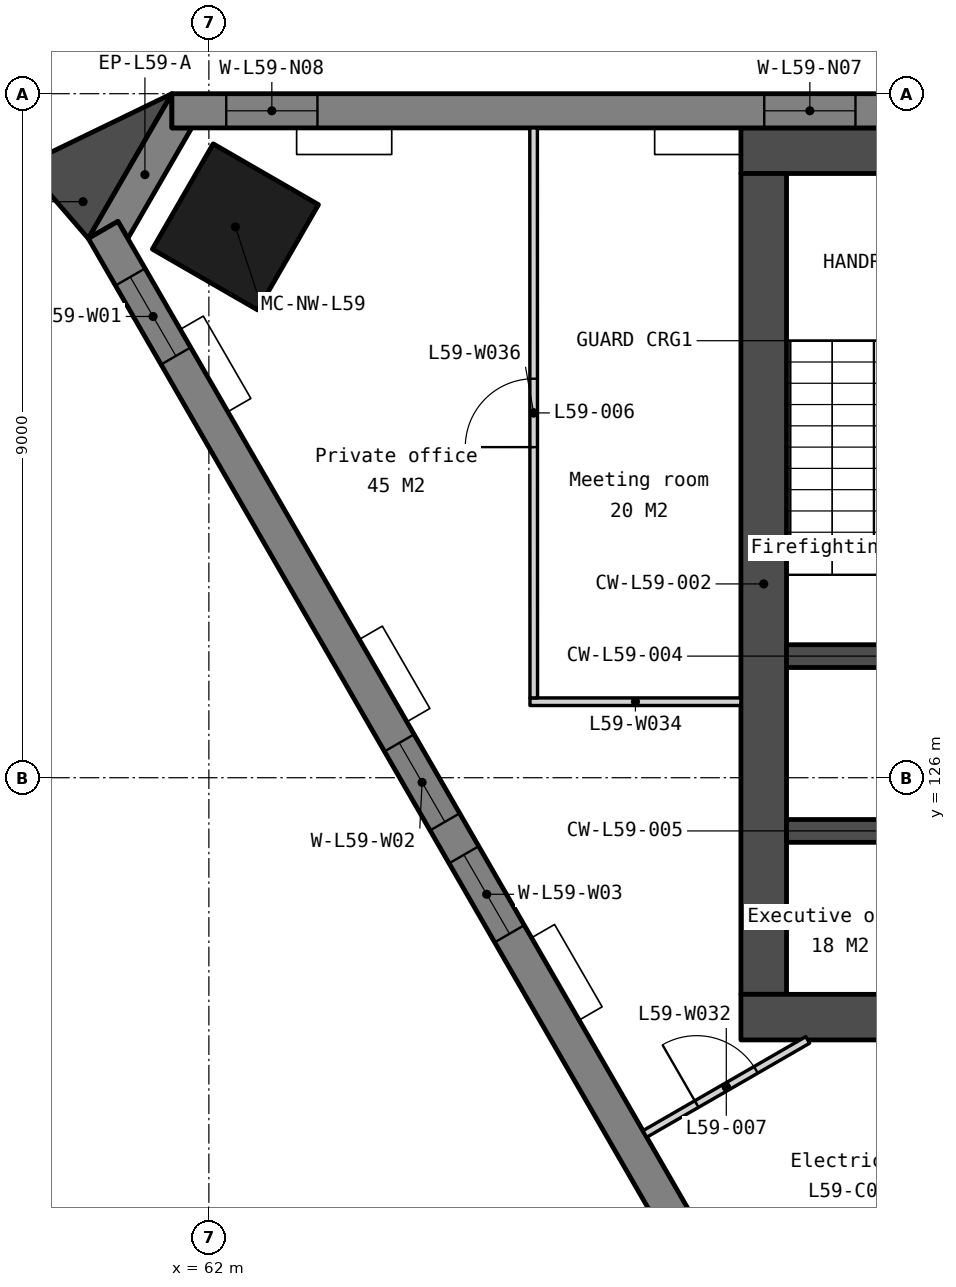
"""IFC4 building model, lengths in metres.
Left out: names, types, materials, properties, quantities, classifications, styles, units other than length and angle.
Written with IfcOpenShell. Run it as: python <this file> out.ifc"""

import sys

from ifc_helpers import new_model, si_unit, direction, frame, frame_2d, origin, origin_2d, place, context, subcontext, project, spatial, polyline, rectangle, outline, extrude, element, fill, save


model = new_model("IFC4")
c1 = context("Model", 3, precision=1e-05, world=origin(), true_north=direction((0.0, 1.0)))
c2 = subcontext(c1, "Body", "Model", "MODEL_VIEW")
j1 = project(units=[si_unit("LENGTHUNIT", "METRE"), si_unit("PLANEANGLEUNIT", "RADIAN")], contexts=[c1])
p1 = place(None, origin())
s1 = spatial("IfcSite", under=j1, at=p1, CompositionType="ELEMENT")
p2 = place(p1, origin())
s2 = spatial("IfcBuilding", under=s1, at=p2, CompositionType="ELEMENT")
p3 = place(p2, frame((0.0, 0.0, 242.6)))
s3 = spatial("IfcBuildingStorey", under=s2, at=p3, CompositionType="ELEMENT", Elevation=242.6)
p4 = place(p3, frame((62.349, 133.247, 0.0), z_axis=(0.0, 0.0, 1.0), x_axis=(-0.5, -0.866025403784, 0.0)))
e1 = element("IfcColumn", 1, at=p4, inside=s3, PredefinedType="COLUMN", context=c2, shape_type="SweptSolid", body=[
    extrude(rectangle(XDim=1.6, YDim=1.6, at=origin_2d()), origin(), (0.0, 0.0, 1.0), 3.9),
])
p5 = place(p3, frame((69.0, 134.25, 0.0), z_axis=(0.0, 0.0, 1.0), x_axis=(1.0, 0.0, 0.0)))
e2 = element("IfcWall", 2, at=p5, inside=s3, PredefinedType="SOLIDWALL", context=c2, shape_type="SweptSolid", body=[
    extrude(rectangle(XDim=22.0, YDim=0.6, at=frame_2d((11.0, 0.0))), origin(), (0.0, 0.0, 1.0), 3.75),
])
p6 = place(p3, frame((69.3, 133.95, 0.0), z_axis=(0.0, 0.0, 1.0), x_axis=(0.0, -1.0, 0.0)))
e3 = element("IfcWall", 3, at=p6, inside=s3, PredefinedType="SOLIDWALL", context=c2, shape_type="SweptSolid", body=[
    extrude(rectangle(XDim=10.8, YDim=0.6, at=frame_2d((5.4, 0.0))), origin(), (0.0, 0.0, 1.0), 3.75),
])
p7 = place(p3, frame((69.0, 122.85, 0.0), z_axis=(0.0, 0.0, 1.0), x_axis=(1.0, 0.0, 0.0)))
e4 = element("IfcWall", 4, at=p7, inside=s3, PredefinedType="SOLIDWALL", context=c2, shape_type="SweptSolid", body=[
    extrude(rectangle(XDim=22.0, YDim=0.6, at=frame_2d((11.0, 0.0))), origin(), (0.0, 0.0, 1.0), 3.75),
])
p8 = place(p7, frame((16.375, 0.0, 0.0)))
e5 = element("IfcOpeningElement", 5, at=p8, cuts=e4, PredefinedType="OPENING", context=c2, shape_type="SweptSolid", body=[
    extrude(rectangle(XDim=1.8, YDim=2.1, at=frame_2d((0.9, 1.05))), frame((0.0, 0.31, 0.0), z_axis=(0.0, -1.0, 0.0), x_axis=(1.0, 0.0, 0.0)), (0.0, 0.0, 1.0), 0.62),
])
p9 = place(p7, frame((3.825, 0.0, 0.0)))
e6 = element("IfcOpeningElement", 6, at=p9, cuts=e4, PredefinedType="OPENING", context=c2, shape_type="SweptSolid", body=[
    extrude(rectangle(XDim=1.8, YDim=2.1, at=frame_2d((0.9, 1.05))), frame((0.0, 0.31, 0.0), z_axis=(0.0, -1.0, 0.0), x_axis=(1.0, 0.0, 0.0)), (0.0, 0.0, 1.0), 0.62),
])
p10 = place(p7, frame((12.85, 0.0, 0.0)))
e7 = element("IfcOpeningElement", 7, at=p10, cuts=e4, PredefinedType="OPENING", context=c2, shape_type="SweptSolid", body=[
    extrude(rectangle(XDim=1.5, YDim=2.1, at=frame_2d((0.75, 1.05))), frame((0.0, 0.31, 0.0), z_axis=(0.0, -1.0, 0.0), x_axis=(1.0, 0.0, 0.0)), (0.0, 0.0, 1.0), 0.62),
])
for number, where, z_axis, x_axis in (
    (8, (69.6, 127.6, 0.0), (0.0, 0.0, 1.0), (1.0, 0.0, 0.0)),
    (9, (69.6, 125.3, 0.0), (0.0, 0.0, 1.0), (1.0, 0.0, 0.0)),
):
    element("IfcWall", number, at=place(p3, frame(where, z_axis=z_axis, x_axis=x_axis)), inside=s3, PredefinedType="SOLIDWALL", context=c2, shape_type="SweptSolid", body=[
        extrude(rectangle(XDim=2.55, YDim=0.3, at=frame_2d((1.275, 0.0))), origin(), (0.0, 0.0, 1.0), 3.75),
    ])
p11 = place(p3, frame((0.0, 0.0, -0.15)))
e10 = element("IfcWall", 10, at=p11, inside=s3, PredefinedType="SOLIDWALL", context=c2, shape_type="SweptSolid", body=[
    extrude(outline(polyline([(61.514, 135.0), (61.514, 134.55), (61.774, 134.55), (60.933, 133.095), (60.803, 133.32), (60.414, 133.095), (61.514, 135.0)])), origin(), (0.0, 0.0, 1.0), 3.9),
])
p12 = place(p3, frame((98.486, 134.775, -0.15), z_axis=(0.0, 0.0, 1.0), x_axis=(-1.0, 0.0, 0.0)))
e11 = element("IfcWall", 11, at=p12, inside=s3, PredefinedType="SOLIDWALL", context=c2, shape_type="SweptSolid", body=[
    extrude(outline(polyline([(36.972, 0.0), (36.972, 3.9), (0.0, 3.9), (0.0, 0.0), (36.972, 0.0)])), frame((0.0, 0.225, 0.0), z_axis=(0.0, -1.0, 0.0), x_axis=(1.0, 0.0, 0.0)), (0.0, 0.0, 1.0), 0.45),
])
p13 = place(p12, frame((0.715, 0.0, 0.95)))
e12 = element("IfcOpeningElement", 12, at=p13, cuts=e11, PredefinedType="OPENING", context=c2, shape_type="SweptSolid", body=[
    extrude(rectangle(XDim=1.2, YDim=2.2, at=frame_2d((0.6, 1.1))), frame((0.0, 0.235, 0.0), z_axis=(0.0, -1.0, 0.0), x_axis=(1.0, 0.0, 0.0)), (0.0, 0.0, 1.0), 0.47),
])
p14 = place(p12, frame((7.793, 0.0, 0.95)))
e13 = element("IfcOpeningElement", 13, at=p14, cuts=e11, PredefinedType="OPENING", context=c2, shape_type="SweptSolid", body=[
    extrude(rectangle(XDim=1.2, YDim=2.2, at=frame_2d((0.6, 1.1))), frame((0.0, 0.235, 0.0), z_axis=(0.0, -1.0, 0.0), x_axis=(1.0, 0.0, 0.0)), (0.0, 0.0, 1.0), 0.47),
])
p15 = place(p12, frame((9.493, 0.0, 0.95)))
e14 = element("IfcOpeningElement", 14, at=p15, cuts=e11, PredefinedType="OPENING", context=c2, shape_type="SweptSolid", body=[
    extrude(rectangle(XDim=1.2, YDim=2.2, at=frame_2d((0.6, 1.1))), frame((0.0, 0.235, 0.0), z_axis=(0.0, -1.0, 0.0), x_axis=(1.0, 0.0, 0.0)), (0.0, 0.0, 1.0), 0.47),
])
p16 = place(p12, frame((17.036, 0.0, 0.95)))
e15 = element("IfcOpeningElement", 15, at=p16, cuts=e11, PredefinedType="OPENING", context=c2, shape_type="SweptSolid", body=[
    extrude(rectangle(XDim=1.2, YDim=2.2, at=frame_2d((0.6, 1.1))), frame((0.0, 0.235, 0.0), z_axis=(0.0, -1.0, 0.0), x_axis=(1.0, 0.0, 0.0)), (0.0, 0.0, 1.0), 0.47),
])
p17 = place(p12, frame((18.736, 0.0, 0.95)))
e16 = element("IfcOpeningElement", 16, at=p17, cuts=e11, PredefinedType="OPENING", context=c2, shape_type="SweptSolid", body=[
    extrude(rectangle(XDim=1.2, YDim=2.2, at=frame_2d((0.6, 1.1))), frame((0.0, 0.235, 0.0), z_axis=(0.0, -1.0, 0.0), x_axis=(1.0, 0.0, 0.0)), (0.0, 0.0, 1.0), 0.47),
])
p18 = place(p12, frame((26.279, 0.0, 0.95)))
e17 = element("IfcOpeningElement", 17, at=p18, cuts=e11, PredefinedType="OPENING", context=c2, shape_type="SweptSolid", body=[
    extrude(rectangle(XDim=1.2, YDim=2.2, at=frame_2d((0.6, 1.1))), frame((0.0, 0.235, 0.0), z_axis=(0.0, -1.0, 0.0), x_axis=(1.0, 0.0, 0.0)), (0.0, 0.0, 1.0), 0.47),
])
p19 = place(p12, frame((27.979, 0.0, 0.95)))
e18 = element("IfcOpeningElement", 18, at=p19, cuts=e11, PredefinedType="OPENING", context=c2, shape_type="SweptSolid", body=[
    extrude(rectangle(XDim=1.2, YDim=2.2, at=frame_2d((0.6, 1.1))), frame((0.0, 0.235, 0.0), z_axis=(0.0, -1.0, 0.0), x_axis=(1.0, 0.0, 0.0)), (0.0, 0.0, 1.0), 0.47),
])
p20 = place(p12, frame((35.058, 0.0, 0.95)))
e19 = element("IfcOpeningElement", 19, at=p20, cuts=e11, PredefinedType="OPENING", context=c2, shape_type="SweptSolid", body=[
    extrude(rectangle(XDim=1.2, YDim=2.2, at=frame_2d((0.6, 1.1))), frame((0.0, 0.235, 0.0), z_axis=(0.0, -1.0, 0.0), x_axis=(1.0, 0.0, 0.0)), (0.0, 0.0, 1.0), 0.47),
])
p21 = place(p3, frame((60.609, 133.207, -0.15), z_axis=(0.0, 0.0, 1.0), x_axis=(0.500002536638, -0.866023939251, 0.0)))
e20 = element("IfcWall", 20, at=p21, inside=s3, PredefinedType="SOLIDWALL", context=c2, shape_type="SweptSolid", body=[
    extrude(outline(polyline([(36.972, 0.0), (36.972, 3.9), (0.0, 3.9), (0.0, 0.0), (36.972, 0.0)])), frame((0.0, 0.225, 0.0), z_axis=(0.0, -1.0, 0.0), x_axis=(1.0, 0.0, 0.0)), (0.0, 0.0, 1.0), 0.45),
])
p22 = place(p21, frame((0.715, 0.0, 0.95)))
e21 = element("IfcOpeningElement", 21, at=p22, cuts=e20, PredefinedType="OPENING", context=c2, shape_type="SweptSolid", body=[
    extrude(rectangle(XDim=1.2, YDim=2.2, at=frame_2d((0.6, 1.1))), frame((0.0, 0.235, 0.0), z_axis=(0.0, -1.0, 0.0), x_axis=(1.0, 0.0, 0.0)), (0.0, 0.0, 1.0), 0.47),
])
p23 = place(p21, frame((7.793, 0.0, 0.95)))
e22 = element("IfcOpeningElement", 22, at=p23, cuts=e20, PredefinedType="OPENING", context=c2, shape_type="SweptSolid", body=[
    extrude(rectangle(XDim=1.2, YDim=2.2, at=frame_2d((0.6, 1.1))), frame((0.0, 0.235, 0.0), z_axis=(0.0, -1.0, 0.0), x_axis=(1.0, 0.0, 0.0)), (0.0, 0.0, 1.0), 0.47),
])
p24 = place(p21, frame((9.493, 0.0, 0.95)))
e23 = element("IfcOpeningElement", 23, at=p24, cuts=e20, PredefinedType="OPENING", context=c2, shape_type="SweptSolid", body=[
    extrude(rectangle(XDim=1.2, YDim=2.2, at=frame_2d((0.6, 1.1))), frame((0.0, 0.235, 0.0), z_axis=(0.0, -1.0, 0.0), x_axis=(1.0, 0.0, 0.0)), (0.0, 0.0, 1.0), 0.47),
])
p25 = place(p21, frame((17.036, 0.0, 0.95)))
e24 = element("IfcOpeningElement", 24, at=p25, cuts=e20, PredefinedType="OPENING", context=c2, shape_type="SweptSolid", body=[
    extrude(rectangle(XDim=1.2, YDim=2.2, at=frame_2d((0.6, 1.1))), frame((0.0, 0.235, 0.0), z_axis=(0.0, -1.0, 0.0), x_axis=(1.0, 0.0, 0.0)), (0.0, 0.0, 1.0), 0.47),
])
p26 = place(p21, frame((18.736, 0.0, 0.95)))
e25 = element("IfcOpeningElement", 25, at=p26, cuts=e20, PredefinedType="OPENING", context=c2, shape_type="SweptSolid", body=[
    extrude(rectangle(XDim=1.2, YDim=2.2, at=frame_2d((0.6, 1.1))), frame((0.0, 0.235, 0.0), z_axis=(0.0, -1.0, 0.0), x_axis=(1.0, 0.0, 0.0)), (0.0, 0.0, 1.0), 0.47),
])
p27 = place(p21, frame((26.279, 0.0, 0.95)))
e26 = element("IfcOpeningElement", 26, at=p27, cuts=e20, PredefinedType="OPENING", context=c2, shape_type="SweptSolid", body=[
    extrude(rectangle(XDim=1.2, YDim=2.2, at=frame_2d((0.6, 1.1))), frame((0.0, 0.235, 0.0), z_axis=(0.0, -1.0, 0.0), x_axis=(1.0, 0.0, 0.0)), (0.0, 0.0, 1.0), 0.47),
])
p28 = place(p21, frame((27.979, 0.0, 0.95)))
e27 = element("IfcOpeningElement", 27, at=p28, cuts=e20, PredefinedType="OPENING", context=c2, shape_type="SweptSolid", body=[
    extrude(rectangle(XDim=1.2, YDim=2.2, at=frame_2d((0.6, 1.1))), frame((0.0, 0.235, 0.0), z_axis=(0.0, -1.0, 0.0), x_axis=(1.0, 0.0, 0.0)), (0.0, 0.0, 1.0), 0.47),
])
p29 = place(p21, frame((35.058, 0.0, 0.95)))
e28 = element("IfcOpeningElement", 28, at=p29, cuts=e20, PredefinedType="OPENING", context=c2, shape_type="SweptSolid", body=[
    extrude(rectangle(XDim=1.2, YDim=2.2, at=frame_2d((0.6, 1.1))), frame((0.0, 0.235, 0.0), z_axis=(0.0, -1.0, 0.0), x_axis=(1.0, 0.0, 0.0)), (0.0, 0.0, 1.0), 0.47),
])
p30 = place(p3, frame((0.0, 0.0, -0.15)))
e29 = element("IfcWall", 29, at=p30, inside=s3, PredefinedType="SOLIDWALL", context=c2, shape_type="SweptSolid", body=[
    extrude(outline(polyline([(61.514, 135.0), (59.578, 134.063), (60.414, 133.095), (61.514, 135.0)])), origin(), (0.0, 0.0, 1.0), 3.9),
])
p31 = place(p3, frame((67.736, 121.313, 0.0), z_axis=(0.0, 0.0, 1.0), x_axis=(0.866024577697, 0.500001430823, 0.0)))
e30 = element("IfcWall", 30, at=p31, inside=s3, PredefinedType="PARTITIONING", context=c2, shape_type="SweptSolid", body=[
    extrude(rectangle(XDim=2.475, YDim=0.1, at=frame_2d((1.237, 0.0))), origin(), (0.0, 0.0, 1.0), 3.75),
])
p32 = place(p31, frame((0.787, 0.0, 0.0)))
e31 = element("IfcOpeningElement", 31, at=p32, cuts=e30, PredefinedType="OPENING", context=c2, shape_type="SweptSolid", body=[
    extrude(rectangle(XDim=0.9, YDim=2.1, at=frame_2d((0.45, 1.05))), frame((0.0, 0.06, 0.0), z_axis=(0.0, -1.0, 0.0), x_axis=(1.0, 0.0, 0.0)), (0.0, 0.0, 1.0), 0.12),
])
p33 = place(p3, frame((66.224, 127.0, 0.0), z_axis=(0.0, 0.0, 1.0), x_axis=(1.0, 0.0, 0.0)))
e32 = element("IfcWall", 32, at=p33, inside=s3, PredefinedType="PARTITIONING", context=c2, shape_type="SweptSolid", body=[
    extrude(rectangle(XDim=2.776, YDim=0.1, at=frame_2d((1.388, 0.0))), origin(), (0.0, 0.0, 1.0), 3.75),
])
p34 = place(p3, frame((66.274, 127.05, 0.0), z_axis=(0.0, 0.0, 1.0), x_axis=(-0.000292978274, 0.999999957082, 0.0)))
e33 = element("IfcWall", 33, at=p34, inside=s3, PredefinedType="PARTITIONING", context=c2, shape_type="SweptSolid", body=[
    extrude(rectangle(XDim=7.5, YDim=0.1, at=frame_2d((3.75, 0.0))), origin(), (0.0, 0.0, 1.0), 3.75),
])
p35 = place(p34, frame((3.3, 0.0, 0.0)))
e34 = element("IfcOpeningElement", 34, at=p35, cuts=e33, PredefinedType="OPENING", context=c2, shape_type="SweptSolid", body=[
    extrude(rectangle(XDim=0.9, YDim=2.1, at=frame_2d((0.45, 1.05))), frame((0.0, 0.06, 0.0), z_axis=(0.0, -1.0, 0.0), x_axis=(1.0, 0.0, 0.0)), (0.0, 0.0, 1.0), 0.12),
])
p36 = place(p19, origin())
e35 = element("IfcWindow", 35, at=p36, inside=s3, PartitioningType="SINGLE_PANEL", PredefinedType="WINDOW", context=c2, shape_type="SweptSolid", body=[
    extrude(rectangle(XDim=1.2, YDim=2.2, at=frame_2d((0.6, 1.1))), frame((0.0, 0.03, 0.0), z_axis=(0.0, -1.0, 0.0), x_axis=(1.0, 0.0, 0.0)), (0.0, 0.0, 1.0), 0.06),
])
fill(e18, e35)
p37 = place(p20, origin())
e36 = element("IfcWindow", 36, at=p37, inside=s3, PartitioningType="SINGLE_PANEL", PredefinedType="WINDOW", context=c2, shape_type="SweptSolid", body=[
    extrude(rectangle(XDim=1.2, YDim=2.2, at=frame_2d((0.6, 1.1))), frame((0.0, 0.03, 0.0), z_axis=(0.0, -1.0, 0.0), x_axis=(1.0, 0.0, 0.0)), (0.0, 0.0, 1.0), 0.06),
])
fill(e19, e36)
p38 = place(p22, origin())
e37 = element("IfcWindow", 37, at=p38, inside=s3, PartitioningType="SINGLE_PANEL", PredefinedType="WINDOW", context=c2, shape_type="SweptSolid", body=[
    extrude(rectangle(XDim=1.2, YDim=2.2, at=frame_2d((0.6, 1.1))), frame((0.0, 0.03, 0.0), z_axis=(0.0, -1.0, 0.0), x_axis=(1.0, 0.0, 0.0)), (0.0, 0.0, 1.0), 0.06),
])
fill(e21, e37)
p39 = place(p23, origin())
e38 = element("IfcWindow", 38, at=p39, inside=s3, PartitioningType="SINGLE_PANEL", PredefinedType="WINDOW", context=c2, shape_type="SweptSolid", body=[
    extrude(rectangle(XDim=1.2, YDim=2.2, at=frame_2d((0.6, 1.1))), frame((0.0, 0.03, 0.0), z_axis=(0.0, -1.0, 0.0), x_axis=(1.0, 0.0, 0.0)), (0.0, 0.0, 1.0), 0.06),
])
fill(e22, e38)
p40 = place(p24, origin())
e39 = element("IfcWindow", 39, at=p40, inside=s3, PartitioningType="SINGLE_PANEL", PredefinedType="WINDOW", context=c2, shape_type="SweptSolid", body=[
    extrude(rectangle(XDim=1.2, YDim=2.2, at=frame_2d((0.6, 1.1))), frame((0.0, 0.03, 0.0), z_axis=(0.0, -1.0, 0.0), x_axis=(1.0, 0.0, 0.0)), (0.0, 0.0, 1.0), 0.06),
])
fill(e23, e39)
p41 = place(p35, origin())
e40 = element("IfcDoor", 40, at=p41, inside=s3, OperationType="SINGLE_SWING_LEFT", PredefinedType="DOOR", context=c2, shape_type="SweptSolid", body=[
    extrude(rectangle(XDim=0.9, YDim=2.1, at=frame_2d((0.45, 1.05))), frame((0.0, 0.025, 0.0), z_axis=(0.0, -1.0, 0.0), x_axis=(1.0, 0.0, 0.0)), (0.0, 0.0, 1.0), 0.05),
])
fill(e34, e40)
p42 = place(p32, origin())
e41 = element("IfcDoor", 41, at=p42, inside=s3, OperationType="SINGLE_SWING_LEFT", PredefinedType="DOOR", context=c2, shape_type="SweptSolid", body=[
    extrude(rectangle(XDim=0.9, YDim=2.1, at=frame_2d((0.45, 1.05))), frame((0.0, 0.025, 0.0), z_axis=(0.0, -1.0, 0.0), x_axis=(1.0, 0.0, 0.0)), (0.0, 0.0, 1.0), 0.05),
])
fill(e31, e41)
save(model, sys.argv[1])
